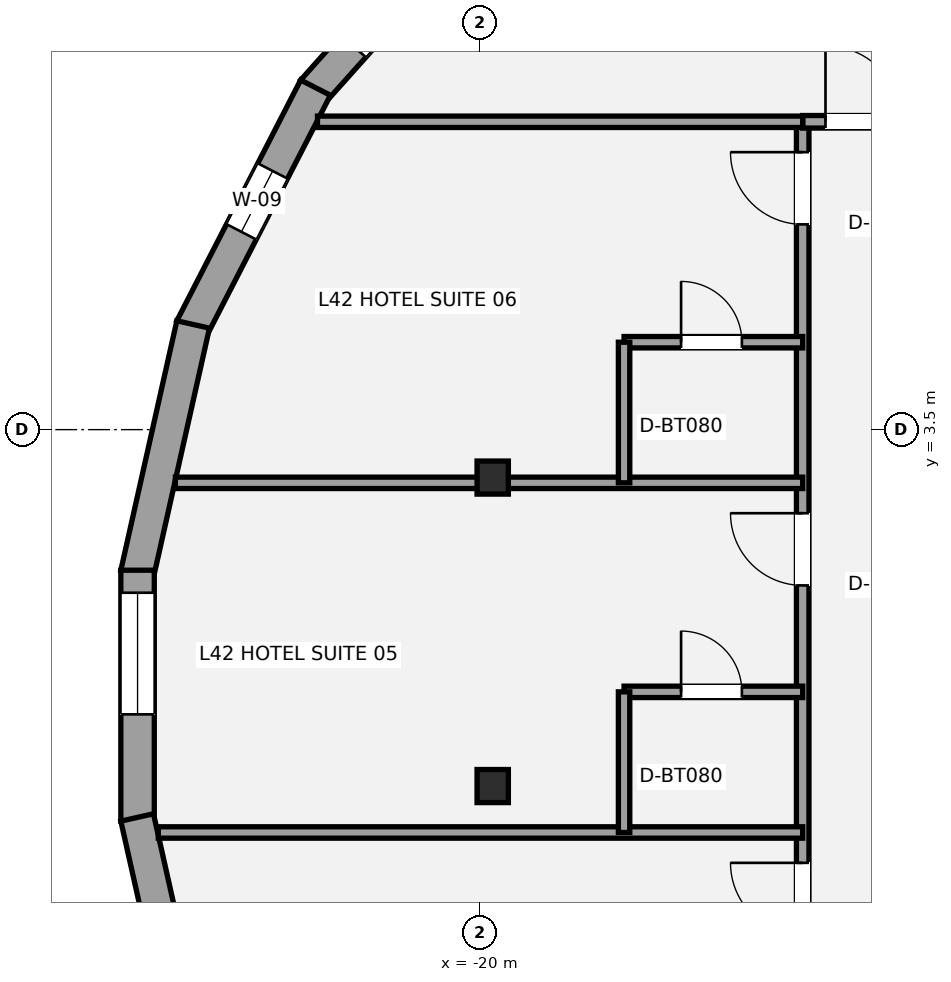
"""IFC4 building model, lengths in metres.
Left out: names, types, materials, properties, quantities, classifications, styles, units other than length and angle.
Written with IfcOpenShell. Run it as: python <this file> out.ifc"""

import sys

from ifc_helpers import new_model, si_unit, direction, frame, frame_2d, origin, origin_2d, place, context, subcontext, project, spatial, rectangle, i_section, extrude, element, fill, save


model = new_model("IFC4")
c1 = context("Model", 3, precision=1e-05, world=origin(), true_north=direction((0.0, 1.0)))
c2 = subcontext(c1, "Body", "Model", "MODEL_VIEW")
j1 = project(units=[si_unit("LENGTHUNIT", "METRE"), si_unit("PLANEANGLEUNIT", "RADIAN")], contexts=[c1])
p1 = place(None, origin())
s1 = spatial("IfcSite", under=j1, at=p1, CompositionType="ELEMENT")
p2 = place(p1, origin())
s2 = spatial("IfcBuilding", under=s1, at=p2, CompositionType="ELEMENT")
p3 = place(p2, frame((0.0, 0.0, 156.6)))
s3 = spatial("IfcBuildingStorey", under=s2, at=p3, CompositionType="ELEMENT", Elevation=156.6)
for number, where, z_axis, x_axis in (
    (1, (-19.828, 2.869, 0.0), (0.0, 0.0, 1.0), (1.0, 0.0, 0.0)),
    (2, (-19.828, -1.189, 0.0), (0.0, 0.0, 1.0), (1.0, 0.0, 0.0)),
):
    element("IfcColumn", number, at=place(p3, frame(where, z_axis=z_axis, x_axis=x_axis)), inside=s3, PredefinedType="COLUMN", context=c2, shape_type="SweptSolid", body=[
        extrude(i_section(OverallWidth=0.412, OverallDepth=0.435, WebThickness=0.036, FlangeThickness=0.057, at=origin_2d()), origin(), (0.0, 0.0, 1.0), 3.2),
    ])
p4 = place(p3, frame((-22.191, 7.953, 0.0), z_axis=(0.0, 0.0, 1.0), x_axis=(0.666335444554, 0.745652114147, 0.0)))
e3 = element("IfcWall", 3, at=p4, inside=s3, PredefinedType="STANDARD", context=c2, shape_type="SweptSolid", body=[
    extrude(rectangle(XDim=3.885, YDim=0.44, at=frame_2d((1.942, 0.0))), origin(), (0.0, 0.0, 1.0), 2.315),
])
p5 = place(p4, frame((0.795, 0.0, 0.58)))
e4 = element("IfcOpeningElement", 4, at=p5, cuts=e3, PredefinedType="OPENING", context=c2, shape_type="SweptSolid", body=[
    extrude(rectangle(XDim=1.6, YDim=1.55, at=frame_2d((0.8, 0.775))), frame((0.0, 0.23, 0.0), z_axis=(0.0, -1.0, 0.0), x_axis=(1.0, 0.0, 0.0)), (0.0, 0.0, 1.0), 0.46),
])
p6 = place(p3, frame((-23.789, 4.831, 0.0), z_axis=(0.0, 0.0, 1.0), x_axis=(0.457409955052, 0.889255943483, 0.0)))
e5 = element("IfcWall", 5, at=p6, inside=s3, PredefinedType="STANDARD", context=c2, shape_type="SweptSolid", body=[
    extrude(rectangle(XDim=3.562, YDim=0.44, at=frame_2d((1.781, 0.0))), origin(), (0.0, 0.0, 1.0), 2.315),
])
p7 = place(p6, frame((1.429, 0.0, 0.58)))
e6 = element("IfcOpeningElement", 6, at=p7, cuts=e5, PredefinedType="OPENING", context=c2, shape_type="SweptSolid", body=[
    extrude(rectangle(XDim=0.9, YDim=1.35, at=frame_2d((0.45, 0.675))), frame((0.0, 0.23, 0.0), z_axis=(0.0, -1.0, 0.0), x_axis=(1.0, 0.0, 0.0)), (0.0, 0.0, 1.0), 0.46),
])
p8 = place(p3, frame((-24.506, 1.602, 0.0), z_axis=(0.0, 0.0, 1.0), x_axis=(0.219028468724, 0.97571846856, 0.0)))
e7 = element("IfcWall", 7, at=p8, inside=s3, PredefinedType="STANDARD", context=c2, shape_type="SweptSolid", body=[
    extrude(rectangle(XDim=3.363, YDim=0.44, at=frame_2d((1.681, 0.0))), origin(), (0.0, 0.0, 1.0), 2.315),
])
p9 = place(p3, frame((-24.501, -1.65, 0.0), z_axis=(0.0, 0.0, 1.0), x_axis=(0.0, 1.0, 0.0)))
e8 = element("IfcWall", 8, at=p9, inside=s3, PredefinedType="STANDARD", context=c2, shape_type="SweptSolid", body=[
    extrude(rectangle(XDim=3.301, YDim=0.44, at=frame_2d((1.65, 0.0))), origin(), (0.0, 0.0, 1.0), 2.315),
])
p10 = place(p9, frame((1.405, 0.0, 0.58)))
e9 = element("IfcOpeningElement", 9, at=p10, cuts=e8, PredefinedType="OPENING", context=c2, shape_type="SweptSolid", body=[
    extrude(rectangle(XDim=1.6, YDim=1.55, at=frame_2d((0.8, 0.775))), frame((0.0, 0.23, 0.0), z_axis=(0.0, -1.0, 0.0), x_axis=(1.0, 0.0, 0.0)), (0.0, 0.0, 1.0), 0.46),
])
p11 = place(p3, frame((-23.77, -4.884, 0.0), z_axis=(0.0, 0.0, 1.0), x_axis=(-0.219028468724, 0.97571846856, 0.0)))
e10 = element("IfcWall", 10, at=p11, inside=s3, PredefinedType="STANDARD", context=c2, shape_type="SweptSolid", body=[
    extrude(rectangle(XDim=3.363, YDim=0.44, at=frame_2d((1.681, 0.0))), origin(), (0.0, 0.0, 1.0), 2.315),
])
p12 = place(p11, frame((0.346, 0.0, 0.58)))
e11 = element("IfcOpeningElement", 11, at=p12, cuts=e10, PredefinedType="OPENING", context=c2, shape_type="SweptSolid", body=[
    extrude(rectangle(XDim=1.6, YDim=1.55, at=frame_2d((0.8, 0.775))), frame((0.0, 0.23, 0.0), z_axis=(0.0, -1.0, 0.0), x_axis=(1.0, 0.0, 0.0)), (0.0, 0.0, 1.0), 0.46),
])
p13 = place(p3, frame((-15.75, -13.108, 0.0), z_axis=(0.0, 0.0, 1.0), x_axis=(0.0, 1.0, 0.0)))
e12 = element("IfcWall", 12, at=p13, inside=s3, PredefinedType="PARTITIONING", context=c2, shape_type="SweptSolid", body=[
    extrude(rectangle(XDim=20.658, YDim=0.165, at=frame_2d((10.329, 0.0))), origin(), (0.0, 0.0, 1.0), 2.473),
])
p14 = place(p13, frame((5.559, 0.0, 0.0)))
e13 = element("IfcOpeningElement", 13, at=p14, cuts=e12, PredefinedType="OPENING", context=c2, shape_type="SweptSolid", body=[
    extrude(rectangle(XDim=0.85, YDim=2.1, at=frame_2d((0.425, 1.05))), frame((0.0, 0.093, 0.0), z_axis=(0.0, -1.0, 0.0), x_axis=(1.0, 0.0, 0.0)), (0.0, 0.0, 1.0), 0.185),
])
p15 = place(p13, frame((9.959, 0.0, 0.0)))
e14 = element("IfcOpeningElement", 14, at=p15, cuts=e12, PredefinedType="OPENING", context=c2, shape_type="SweptSolid", body=[
    extrude(rectangle(XDim=0.95, YDim=2.15, at=frame_2d((0.475, 1.075))), frame((0.0, 0.093, 0.0), z_axis=(0.0, -1.0, 0.0), x_axis=(1.0, 0.0, 0.0)), (0.0, 0.0, 1.0), 0.185),
])
p16 = place(p13, frame((14.559, 0.0, 0.0)))
e15 = element("IfcOpeningElement", 15, at=p16, cuts=e12, PredefinedType="OPENING", context=c2, shape_type="SweptSolid", body=[
    extrude(rectangle(XDim=0.95, YDim=2.15, at=frame_2d((0.475, 1.075))), frame((0.0, 0.093, 0.0), z_axis=(0.0, -1.0, 0.0), x_axis=(1.0, 0.0, 0.0)), (0.0, 0.0, 1.0), 0.185),
])
p17 = place(p13, frame((19.309, 0.0, 0.0)))
e16 = element("IfcOpeningElement", 16, at=p17, cuts=e12, PredefinedType="OPENING", context=c2, shape_type="SweptSolid", body=[
    extrude(rectangle(XDim=0.95, YDim=2.15, at=frame_2d((0.475, 1.075))), frame((0.0, 0.093, 0.0), z_axis=(0.0, -1.0, 0.0), x_axis=(1.0, 0.0, 0.0)), (0.0, 0.0, 1.0), 0.185),
])
p18 = place(p3, frame((-15.75, 7.55, 0.0), z_axis=(0.0, 0.0, 1.0), x_axis=(1.0, 0.0, 0.0)))
e17 = element("IfcWall", 17, at=p18, inside=s3, PredefinedType="PARTITIONING", context=c2, shape_type="SweptSolid", body=[
    extrude(rectangle(XDim=1.95, YDim=0.165, at=frame_2d((0.975, 0.0))), origin(), (0.0, 0.0, 1.0), 3.02),
])
p19 = place(p18, frame((0.3, 0.0, 0.0)))
e18 = element("IfcOpeningElement", 18, at=p19, cuts=e17, PredefinedType="OPENING", context=c2, shape_type="SweptSolid", body=[
    extrude(rectangle(XDim=1.0, YDim=2.15, at=frame_2d((0.5, 1.075))), frame((0.0, 0.093, 0.0), z_axis=(0.0, -1.0, 0.0), x_axis=(1.0, 0.0, 0.0)), (0.0, 0.0, 1.0), 0.185),
])
p20 = place(p3, frame((-22.134, 7.55, 0.0), z_axis=(0.0, 0.0, 1.0), x_axis=(1.0, 0.0, 0.0)))
e19 = element("IfcWall", 19, at=p20, inside=s3, PredefinedType="PLUMBINGWALL", context=c2, shape_type="SweptSolid", body=[
    extrude(rectangle(XDim=6.384, YDim=0.15, at=frame_2d((3.192, 0.0))), origin(), (0.0, 0.0, 1.0), 2.473),
])
p21 = place(p3, frame((-24.228, -1.8, 0.0), z_axis=(0.0, 0.0, 1.0), x_axis=(1.0, 0.0, 0.0)))
e20 = element("IfcWall", 20, at=p21, inside=s3, PredefinedType="PLUMBINGWALL", context=c2, shape_type="SweptSolid", body=[
    extrude(rectangle(XDim=8.478, YDim=0.15, at=frame_2d((4.239, 0.0))), origin(), (0.0, 0.0, 1.0), 2.398),
])
p22 = place(p3, frame((-24.004, 2.8, 0.0), z_axis=(0.0, 0.0, 1.0), x_axis=(1.0, 0.0, 0.0)))
e21 = element("IfcWall", 21, at=p22, inside=s3, PredefinedType="PLUMBINGWALL", context=c2, shape_type="SweptSolid", body=[
    extrude(rectangle(XDim=8.254, YDim=0.15, at=frame_2d((4.127, 0.0))), origin(), (0.0, 0.0, 1.0), 2.473),
])
p23 = place(p3, frame((-18.1, 0.05, 0.0), z_axis=(0.0, 0.0, 1.0), x_axis=(1.0, 0.0, 0.0)))
e22 = element("IfcWall", 22, at=p23, inside=s3, PredefinedType="PLUMBINGWALL", context=c2, shape_type="SweptSolid", body=[
    extrude(rectangle(XDim=2.35, YDim=0.15, at=frame_2d((1.175, 0.0))), origin(), (0.0, 0.0, 1.0), 2.473),
])
p24 = place(p23, frame((0.75, 0.0, 0.0)))
e23 = element("IfcOpeningElement", 23, at=p24, cuts=e22, PredefinedType="OPENING", context=c2, shape_type="SweptSolid", body=[
    extrude(rectangle(XDim=0.8, YDim=2.1, at=frame_2d((0.4, 1.05))), frame((0.0, 0.085, 0.0), z_axis=(0.0, -1.0, 0.0), x_axis=(1.0, 0.0, 0.0)), (0.0, 0.0, 1.0), 0.17),
])
p25 = place(p3, frame((-18.1, -1.8, 0.0), z_axis=(0.0, 0.0, 1.0), x_axis=(0.0, 1.0, 0.0)))
e24 = element("IfcWall", 24, at=p25, inside=s3, PredefinedType="PLUMBINGWALL", context=c2, shape_type="SweptSolid", body=[
    extrude(rectangle(XDim=1.85, YDim=0.15, at=frame_2d((0.925, 0.0))), origin(), (0.0, 0.0, 1.0), 2.473),
])
p26 = place(p3, frame((-18.1, 4.65, 0.0), z_axis=(0.0, 0.0, 1.0), x_axis=(1.0, 0.0, 0.0)))
e25 = element("IfcWall", 25, at=p26, inside=s3, PredefinedType="PLUMBINGWALL", context=c2, shape_type="SweptSolid", body=[
    extrude(rectangle(XDim=2.35, YDim=0.15, at=frame_2d((1.175, 0.0))), origin(), (0.0, 0.0, 1.0), 2.473),
])
p27 = place(p26, frame((0.75, 0.0, 0.0)))
e26 = element("IfcOpeningElement", 26, at=p27, cuts=e25, PredefinedType="OPENING", context=c2, shape_type="SweptSolid", body=[
    extrude(rectangle(XDim=0.8, YDim=2.1, at=frame_2d((0.4, 1.05))), frame((0.0, 0.085, 0.0), z_axis=(0.0, -1.0, 0.0), x_axis=(1.0, 0.0, 0.0)), (0.0, 0.0, 1.0), 0.17),
])
p28 = place(p3, frame((-18.1, 2.8, 0.0), z_axis=(0.0, 0.0, 1.0), x_axis=(0.0, 1.0, 0.0)))
e27 = element("IfcWall", 27, at=p28, inside=s3, PredefinedType="PLUMBINGWALL", context=c2, shape_type="SweptSolid", body=[
    extrude(rectangle(XDim=1.85, YDim=0.15, at=frame_2d((0.925, 0.0))), origin(), (0.0, 0.0, 1.0), 3.02),
])
p29 = place(p7, origin())
e28 = element("IfcWindow", 28, at=p29, inside=s3, PartitioningType="SINGLE_PANEL", PredefinedType="WINDOW", context=c2, shape_type="SweptSolid", body=[
    extrude(rectangle(XDim=0.9, YDim=1.35, at=frame_2d((0.45, 0.675))), frame((0.0, -0.01, 0.0), z_axis=(0.0, -1.0, 0.0), x_axis=(1.0, 0.0, 0.0)), (0.0, 0.0, 1.0), 0.06),
])
fill(e6, e28)
p30 = place(p10, origin())
e29 = element("IfcWindow", 29, at=p30, inside=s3, PartitioningType="SINGLE_PANEL", PredefinedType="WINDOW", context=c2, shape_type="SweptSolid", body=[
    extrude(rectangle(XDim=1.6, YDim=1.55, at=frame_2d((0.8, 0.775))), frame((0.0, -0.01, 0.0), z_axis=(0.0, -1.0, 0.0), x_axis=(1.0, 0.0, 0.0)), (0.0, 0.0, 1.0), 0.06),
])
fill(e9, e29)
p31 = place(p19, origin())
e30 = element("IfcDoor", 30, at=p31, inside=s3, OperationType="SINGLE_SWING_LEFT", PredefinedType="DOOR", context=c2, shape_type="SweptSolid", body=[
    extrude(rectangle(XDim=1.0, YDim=2.15, at=frame_2d((0.5, 1.075))), frame((0.0, 0.025, 0.0), z_axis=(0.0, -1.0, 0.0), x_axis=(1.0, 0.0, 0.0)), (0.0, 0.0, 1.0), 0.05),
])
fill(e18, e30)
p32 = place(p15, origin())
e31 = element("IfcDoor", 31, at=p32, inside=s3, OperationType="SINGLE_SWING_RIGHT", PredefinedType="DOOR", context=c2, shape_type="SweptSolid", body=[
    extrude(rectangle(XDim=0.95, YDim=2.15, at=frame_2d((0.475, 1.075))), frame((0.0, 0.025, 0.0), z_axis=(0.0, -1.0, 0.0), x_axis=(1.0, 0.0, 0.0)), (0.0, 0.0, 1.0), 0.05),
])
fill(e14, e31)
p33 = place(p16, origin())
e32 = element("IfcDoor", 32, at=p33, inside=s3, OperationType="SINGLE_SWING_RIGHT", PredefinedType="DOOR", context=c2, shape_type="SweptSolid", body=[
    extrude(rectangle(XDim=0.95, YDim=2.15, at=frame_2d((0.475, 1.075))), frame((0.0, 0.025, 0.0), z_axis=(0.0, -1.0, 0.0), x_axis=(1.0, 0.0, 0.0)), (0.0, 0.0, 1.0), 0.05),
])
fill(e15, e32)
p34 = place(p24, origin())
e33 = element("IfcDoor", 33, at=p34, inside=s3, OperationType="SINGLE_SWING_LEFT", PredefinedType="DOOR", context=c2, shape_type="SweptSolid", body=[
    extrude(rectangle(XDim=0.8, YDim=2.1, at=frame_2d((0.4, 1.05))), frame((0.0, 0.025, 0.0), z_axis=(0.0, -1.0, 0.0), x_axis=(1.0, 0.0, 0.0)), (0.0, 0.0, 1.0), 0.05),
])
fill(e23, e33)
p35 = place(p17, origin())
e34 = element("IfcDoor", 34, at=p35, inside=s3, OperationType="SINGLE_SWING_RIGHT", PredefinedType="DOOR", context=c2, shape_type="SweptSolid", body=[
    extrude(rectangle(XDim=0.95, YDim=2.15, at=frame_2d((0.475, 1.075))), frame((0.0, 0.025, 0.0), z_axis=(0.0, -1.0, 0.0), x_axis=(1.0, 0.0, 0.0)), (0.0, 0.0, 1.0), 0.05),
])
fill(e16, e34)
p36 = place(p27, origin())
e35 = element("IfcDoor", 35, at=p36, inside=s3, OperationType="SINGLE_SWING_LEFT", PredefinedType="DOOR", context=c2, shape_type="SweptSolid", body=[
    extrude(rectangle(XDim=0.8, YDim=2.1, at=frame_2d((0.4, 1.05))), frame((0.0, 0.025, 0.0), z_axis=(0.0, -1.0, 0.0), x_axis=(1.0, 0.0, 0.0)), (0.0, 0.0, 1.0), 0.05),
])
fill(e26, e35)
save(model, sys.argv[1])
